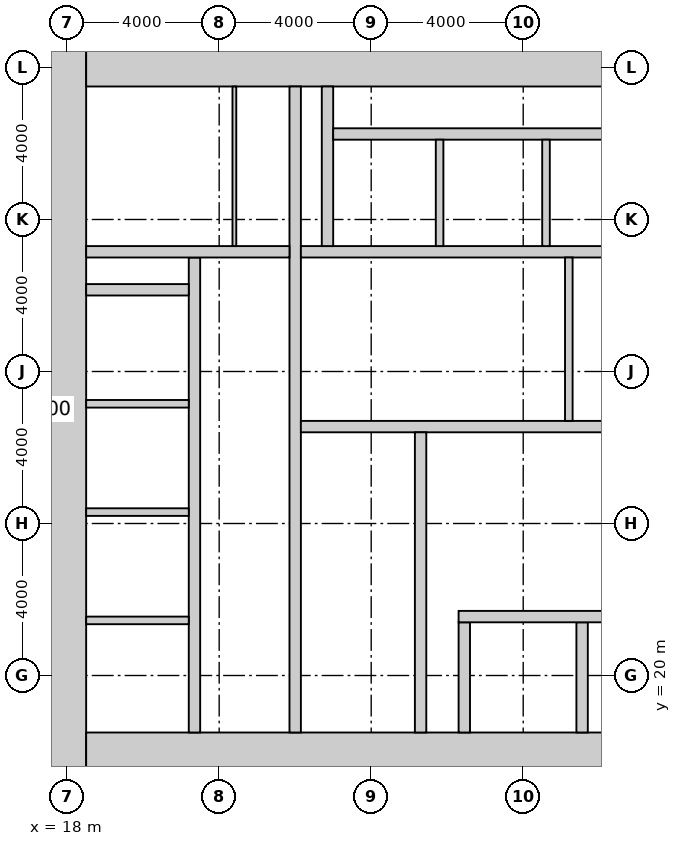
"""IFC4 building model, lengths in metres.
Left out: names, types, materials, properties, quantities, classifications, styles, units other than length and angle.
Written with IfcOpenShell. Run it as: python <this file> out.ifc"""

import sys

from ifc_helpers import new_model, si_unit, direction, frame, frame_2d, origin, place, context, subcontext, project, spatial, rectangle, extrude, element, fill, save


model = new_model("IFC4")
c1 = context("Model", 3, precision=1e-05, world=origin(), true_north=direction((0.0, 1.0)))
c2 = subcontext(c1, "Body", "Model", "MODEL_VIEW")
j1 = project(units=[si_unit("LENGTHUNIT", "METRE"), si_unit("PLANEANGLEUNIT", "RADIAN")], contexts=[c1])
p1 = place(None, origin())
s1 = spatial("IfcSite", under=j1, at=p1, CompositionType="ELEMENT")
p2 = place(p1, origin())
s2 = spatial("IfcBuilding", under=s1, at=p2, CompositionType="ELEMENT")
p3 = place(p2, frame((0.0, 0.0, 121.4)))
s3 = spatial("IfcBuildingStorey", under=s2, at=p3, CompositionType="ELEMENT", Elevation=121.4)
p4 = place(p3, frame((18.0, 17.5, -0.15), z_axis=(0.0, 0.0, 1.0), x_axis=(0.0, 1.0, 0.0)))
e1 = element("IfcWall", 1, at=p4, inside=s3, PredefinedType="SHEAR", context=c2, shape_type="SweptSolid", body=[
    extrude(rectangle(XDim=19.0, YDim=1.0, at=frame_2d((9.5, 0.0))), origin(), (0.0, 0.0, 1.0), 4.0),
])
p5 = place(p3, frame((18.5, 18.0, -0.15), z_axis=(0.0, 0.0, 1.0), x_axis=(1.0, 0.0, 0.0)))
e2 = element("IfcWall", 2, at=p5, inside=s3, PredefinedType="SHEAR", context=c2, shape_type="SweptSolid", body=[
    extrude(rectangle(XDim=17.6, YDim=1.0, at=frame_2d((8.8, 0.0))), origin(), (0.0, 0.0, 1.0), 4.0),
])
p6 = place(p5, frame((3.45, 0.0, 0.15)))
e3 = element("IfcOpeningElement", 3, at=p6, cuts=e2, PredefinedType="OPENING", context=c2, shape_type="SweptSolid", body=[
    extrude(rectangle(XDim=1.5, YDim=2.4, at=frame_2d((0.75, 1.2))), frame((0.0, 0.51, 0.0), z_axis=(0.0, -1.0, 0.0), x_axis=(1.0, 0.0, 0.0)), (0.0, 0.0, 1.0), 1.02),
])
p7 = place(p3, frame((18.5, 36.0, -0.15), z_axis=(0.0, 0.0, 1.0), x_axis=(1.0, 0.0, 0.0)))
e4 = element("IfcWall", 4, at=p7, inside=s3, PredefinedType="SHEAR", context=c2, shape_type="SweptSolid", body=[
    extrude(rectangle(XDim=17.6, YDim=1.0, at=frame_2d((8.8, 0.0))), origin(), (0.0, 0.0, 1.0), 4.0),
])
p8 = place(p3, frame((24.0, 18.5, -0.15), z_axis=(0.0, 0.0, 1.0), x_axis=(0.0, 1.0, 0.0)))
e5 = element("IfcWall", 5, at=p8, inside=s3, PredefinedType="SHEAR", context=c2, shape_type="SweptSolid", body=[
    extrude(rectangle(XDim=17.0, YDim=0.3, at=frame_2d((8.5, 0.0))), origin(), (0.0, 0.0, 1.0), 4.0),
])
p9 = place(p8, frame((9.6, 0.0, 0.15)))
e6 = element("IfcOpeningElement", 6, at=p9, cuts=e5, PredefinedType="OPENING", context=c2, shape_type="SweptSolid", body=[
    extrude(rectangle(XDim=1.5, YDim=2.4, at=frame_2d((0.75, 1.2))), frame((0.0, 0.16, 0.0), z_axis=(0.0, -1.0, 0.0), x_axis=(1.0, 0.0, 0.0)), (0.0, 0.0, 1.0), 0.32),
])
p10 = place(p3, frame((24.15, 26.55, -0.15), z_axis=(0.0, 0.0, 1.0), x_axis=(1.0, 0.0, 0.0)))
e7 = element("IfcWall", 7, at=p10, inside=s3, PredefinedType="SHEAR", context=c2, shape_type="SweptSolid", body=[
    extrude(rectangle(XDim=11.25, YDim=0.3, at=frame_2d((5.625, 0.0))), origin(), (0.0, 0.0, 1.0), 4.0),
])
p11 = place(p10, frame((9.25, 0.0, 0.15)))
e8 = element("IfcOpeningElement", 8, at=p11, cuts=e7, PredefinedType="OPENING", context=c2, shape_type="SweptSolid", body=[
    extrude(rectangle(XDim=1.0, YDim=2.2, at=frame_2d((0.5, 1.1))), frame((0.0, 0.16, 0.0), z_axis=(0.0, -1.0, 0.0), x_axis=(1.0, 0.0, 0.0)), (0.0, 0.0, 1.0), 0.32),
])
p12 = place(p10, frame((4.9, 0.0, 0.15)))
e9 = element("IfcOpeningElement", 9, at=p12, cuts=e7, PredefinedType="OPENING", context=c2, shape_type="SweptSolid", body=[
    extrude(rectangle(XDim=1.5, YDim=2.4, at=frame_2d((0.75, 1.2))), frame((0.0, 0.16, 0.0), z_axis=(0.0, -1.0, 0.0), x_axis=(1.0, 0.0, 0.0)), (0.0, 0.0, 1.0), 0.32),
])
p13 = place(p3, frame((27.3, 18.5, -0.15), z_axis=(0.0, 0.0, 1.0), x_axis=(0.0, 1.0, 0.0)))
e10 = element("IfcWall", 10, at=p13, inside=s3, PredefinedType="SHEAR", context=c2, shape_type="SweptSolid", body=[
    extrude(rectangle(XDim=7.9, YDim=0.3, at=frame_2d((3.95, 0.0))), origin(), (0.0, 0.0, 1.0), 4.0),
])
p14 = place(p13, frame((6.4, 0.0, 0.15)))
e11 = element("IfcOpeningElement", 11, at=p14, cuts=e10, PredefinedType="OPENING", context=c2, shape_type="SweptSolid", body=[
    extrude(rectangle(XDim=1.0, YDim=2.2, at=frame_2d((0.5, 1.1))), frame((0.0, 0.16, 0.0), z_axis=(0.0, -1.0, 0.0), x_axis=(1.0, 0.0, 0.0)), (0.0, 0.0, 1.0), 0.32),
])
for number, where, z_axis, x_axis in (
    (12, (28.45, 18.5, -0.15), (0.0, 0.0, 1.0), (0.0, 1.0, 0.0)),
    (13, (31.55, 18.5, -0.15), (0.0, 0.0, 1.0), (0.0, 1.0, 0.0)),
):
    element("IfcWall", number, at=place(p3, frame(where, z_axis=z_axis, x_axis=x_axis)), inside=s3, PredefinedType="SHEAR", context=c2, shape_type="SweptSolid", body=[
        extrude(rectangle(XDim=2.9, YDim=0.3, at=frame_2d((1.45, 0.0))), origin(), (0.0, 0.0, 1.0), 4.0),
    ])
p15 = place(p3, frame((28.3, 21.55, -0.15), z_axis=(0.0, 0.0, 1.0), x_axis=(1.0, 0.0, 0.0)))
e14 = element("IfcWall", 14, at=p15, inside=s3, PredefinedType="SHEAR", context=c2, shape_type="SweptSolid", body=[
    extrude(rectangle(XDim=3.8, YDim=0.3, at=frame_2d((1.9, 0.0))), origin(), (0.0, 0.0, 1.0), 4.0),
])
p16 = place(p15, frame((1.05, 0.0, 0.15)))
e15 = element("IfcOpeningElement", 15, at=p16, cuts=e14, PredefinedType="OPENING", context=c2, shape_type="SweptSolid", body=[
    extrude(rectangle(XDim=1.3, YDim=2.4, at=frame_2d((0.65, 1.2))), frame((0.0, 0.16, 0.0), z_axis=(0.0, -1.0, 0.0), x_axis=(1.0, 0.0, 0.0)), (0.0, 0.0, 1.0), 0.32),
])
p17 = place(p3, frame((24.15, 31.15, -0.15), z_axis=(0.0, 0.0, 1.0), x_axis=(1.0, 0.0, 0.0)))
e16 = element("IfcWall", 16, at=p17, inside=s3, PredefinedType="SHEAR", context=c2, shape_type="SweptSolid", body=[
    extrude(rectangle(XDim=11.25, YDim=0.3, at=frame_2d((5.625, 0.0))), origin(), (0.0, 0.0, 1.0), 4.0),
])
p18 = place(p17, frame((7.25, 0.0, 0.15)))
e17 = element("IfcOpeningElement", 17, at=p18, cuts=e16, PredefinedType="OPENING", context=c2, shape_type="SweptSolid", body=[
    extrude(rectangle(XDim=1.4, YDim=2.4, at=frame_2d((0.7, 1.2))), frame((0.0, 0.16, 0.0), z_axis=(0.0, -1.0, 0.0), x_axis=(1.0, 0.0, 0.0)), (0.0, 0.0, 1.0), 0.32),
])
p19 = place(p3, frame((21.35, 18.5, -0.15), z_axis=(0.0, 0.0, 1.0), x_axis=(0.0, 1.0, 0.0)))
e18 = element("IfcWall", 18, at=p19, inside=s3, PredefinedType="SHEAR", context=c2, shape_type="SweptSolid", body=[
    extrude(rectangle(XDim=12.5, YDim=0.3, at=frame_2d((6.25, 0.0))), origin(), (0.0, 0.0, 1.0), 4.0),
])
p20 = place(p19, frame((0.875, 0.0, 0.15)))
e19 = element("IfcOpeningElement", 19, at=p20, cuts=e18, PredefinedType="OPENING", context=c2, shape_type="SweptSolid", body=[
    extrude(rectangle(XDim=1.1, YDim=2.2, at=frame_2d((0.55, 1.1))), frame((0.0, 0.16, 0.0), z_axis=(0.0, -1.0, 0.0), x_axis=(1.0, 0.0, 0.0)), (0.0, 0.0, 1.0), 0.32),
])
p21 = place(p19, frame((3.825, 0.0, 0.15)))
e20 = element("IfcOpeningElement", 20, at=p21, cuts=e18, PredefinedType="OPENING", context=c2, shape_type="SweptSolid", body=[
    extrude(rectangle(XDim=1.1, YDim=2.2, at=frame_2d((0.55, 1.1))), frame((0.0, 0.16, 0.0), z_axis=(0.0, -1.0, 0.0), x_axis=(1.0, 0.0, 0.0)), (0.0, 0.0, 1.0), 0.32),
])
p22 = place(p19, frame((6.675, 0.0, 0.15)))
e21 = element("IfcOpeningElement", 21, at=p22, cuts=e18, PredefinedType="OPENING", context=c2, shape_type="SweptSolid", body=[
    extrude(rectangle(XDim=1.1, YDim=2.2, at=frame_2d((0.55, 1.1))), frame((0.0, 0.16, 0.0), z_axis=(0.0, -1.0, 0.0), x_axis=(1.0, 0.0, 0.0)), (0.0, 0.0, 1.0), 0.32),
])
p23 = place(p19, frame((9.575, 0.0, 0.15)))
e22 = element("IfcOpeningElement", 22, at=p23, cuts=e18, PredefinedType="OPENING", context=c2, shape_type="SweptSolid", body=[
    extrude(rectangle(XDim=1.1, YDim=2.2, at=frame_2d((0.55, 1.1))), frame((0.0, 0.16, 0.0), z_axis=(0.0, -1.0, 0.0), x_axis=(1.0, 0.0, 0.0)), (0.0, 0.0, 1.0), 0.32),
])
p24 = place(p3, frame((18.5, 31.15, -0.15), z_axis=(0.0, 0.0, 1.0), x_axis=(1.0, 0.0, 0.0)))
e23 = element("IfcWall", 23, at=p24, inside=s3, PredefinedType="SHEAR", context=c2, shape_type="SweptSolid", body=[
    extrude(rectangle(XDim=5.35, YDim=0.3, at=frame_2d((2.675, 0.0))), origin(), (0.0, 0.0, 1.0), 4.0),
])
p25 = place(p24, frame((4.125, 0.0, 0.15)))
e24 = element("IfcOpeningElement", 24, at=p25, cuts=e23, PredefinedType="OPENING", context=c2, shape_type="SweptSolid", body=[
    extrude(rectangle(XDim=1.0, YDim=2.2, at=frame_2d((0.5, 1.1))), frame((0.0, 0.16, 0.0), z_axis=(0.0, -1.0, 0.0), x_axis=(1.0, 0.0, 0.0)), (0.0, 0.0, 1.0), 0.32),
])
p26 = place(p3, frame((18.5, 30.15, -0.15), z_axis=(0.0, 0.0, 1.0), x_axis=(1.0, 0.0, 0.0)))
e25 = element("IfcWall", 25, at=p26, inside=s3, PredefinedType="SHEAR", context=c2, shape_type="SweptSolid", body=[
    extrude(rectangle(XDim=2.7, YDim=0.3, at=frame_2d((1.35, 0.0))), origin(), (0.0, 0.0, 1.0), 4.0),
])
p27 = place(p3, frame((24.85, 31.3, -0.15), z_axis=(0.0, 0.0, 1.0), x_axis=(0.0, 1.0, 0.0)))
e26 = element("IfcWall", 26, at=p27, inside=s3, PredefinedType="SHEAR", context=c2, shape_type="SweptSolid", body=[
    extrude(rectangle(XDim=4.2, YDim=0.3, at=frame_2d((2.1, 0.0))), origin(), (0.0, 0.0, 1.0), 4.0),
])
p28 = place(p3, frame((25.0, 34.25, -0.15), z_axis=(0.0, 0.0, 1.0), x_axis=(1.0, 0.0, 0.0)))
e27 = element("IfcWall", 27, at=p28, inside=s3, PredefinedType="SHEAR", context=c2, shape_type="SweptSolid", body=[
    extrude(rectangle(XDim=8.6, YDim=0.3, at=frame_2d((4.3, 0.0))), origin(), (0.0, 0.0, 1.0), 4.0),
])
for number, where, z_axis, x_axis in (
    (28, (27.8, 31.3, -0.15), (0.0, 0.0, 1.0), (0.0, 1.0, 0.0)),
    (29, (30.6, 31.3, -0.15), (0.0, 0.0, 1.0), (0.0, 1.0, 0.0)),
):
    element("IfcWall", number, at=place(p3, frame(where, z_axis=z_axis, x_axis=x_axis)), inside=s3, PredefinedType="SOLIDWALL", context=c2, shape_type="SweptSolid", body=[
        extrude(rectangle(XDim=2.8, YDim=0.2, at=frame_2d((1.4, 0.0))), origin(), (0.0, 0.0, 1.0), 4.0),
    ])
for number, where, z_axis, x_axis in (
    (30, (18.5, 21.45, -0.15), (0.0, 0.0, 1.0), (1.0, 0.0, 0.0)),
    (31, (18.5, 24.3, -0.15), (0.0, 0.0, 1.0), (1.0, 0.0, 0.0)),
    (32, (18.5, 27.15, -0.15), (0.0, 0.0, 1.0), (1.0, 0.0, 0.0)),
):
    element("IfcWall", number, at=place(p3, frame(where, z_axis=z_axis, x_axis=x_axis)), inside=s3, PredefinedType="SOLIDWALL", context=c2, shape_type="SweptSolid", body=[
        extrude(rectangle(XDim=2.7, YDim=0.2, at=frame_2d((1.35, 0.0))), origin(), (0.0, 0.0, 1.0), 4.0),
    ])
p29 = place(p3, frame((31.2, 26.7, 0.0), z_axis=(0.0, 0.0, 1.0), x_axis=(0.0, 1.0, 0.0)))
e33 = element("IfcWall", 33, at=p29, inside=s3, PredefinedType="SOLIDWALL", context=c2, shape_type="SweptSolid", body=[
    extrude(rectangle(XDim=4.3, YDim=0.2, at=frame_2d((2.15, 0.0))), origin(), (0.0, 0.0, 1.0), 3.85),
])
p30 = place(p3, frame((22.4, 31.3, 0.0), z_axis=(0.0, 0.0, 1.0), x_axis=(0.0, 1.0, 0.0)))
e34 = element("IfcWall", 34, at=p30, inside=s3, PredefinedType="PARTITIONING", context=c2, shape_type="SweptSolid", body=[
    extrude(rectangle(XDim=4.2, YDim=0.1, at=frame_2d((2.1, 0.0))), origin(), (0.0, 0.0, 1.0), 3.85),
])
p31 = place(p30, frame((1.55, 0.0, 0.0)))
e35 = element("IfcOpeningElement", 35, at=p31, cuts=e34, PredefinedType="OPENING", context=c2, shape_type="SweptSolid", body=[
    extrude(rectangle(XDim=1.0, YDim=2.2, at=frame_2d((0.5, 1.1))), frame((0.0, 0.06, 0.0), z_axis=(0.0, -1.0, 0.0), x_axis=(1.0, 0.0, 0.0)), (0.0, 0.0, 1.0), 0.12),
])
p32 = place(p14, origin())
e36 = element("IfcDoor", 36, at=p32, inside=s3, OperationType="SINGLE_SWING_RIGHT", PredefinedType="DOOR", context=c2, shape_type="SweptSolid", body=[
    extrude(rectangle(XDim=1.0, YDim=2.2, at=frame_2d((0.5, 1.1))), frame((0.0, 0.025, 0.0), z_axis=(0.0, -1.0, 0.0), x_axis=(1.0, 0.0, 0.0)), (0.0, 0.0, 1.0), 0.05),
])
fill(e11, e36)
p33 = place(p12, origin())
e37 = element("IfcDoor", 37, at=p33, inside=s3, OperationType="DOUBLE_DOOR_DOUBLE_SWING", PredefinedType="DOOR", context=c2, shape_type="SweptSolid", body=[
    extrude(rectangle(XDim=1.5, YDim=2.4, at=frame_2d((0.75, 1.2))), frame((0.0, 0.025, 0.0), z_axis=(0.0, -1.0, 0.0), x_axis=(1.0, 0.0, 0.0)), (0.0, 0.0, 1.0), 0.05),
])
fill(e9, e37)
p34 = place(p9, origin())
e38 = element("IfcDoor", 38, at=p34, inside=s3, OperationType="DOUBLE_DOOR_DOUBLE_SWING", PredefinedType="DOOR", context=c2, shape_type="SweptSolid", body=[
    extrude(rectangle(XDim=1.5, YDim=2.4, at=frame_2d((0.75, 1.2))), frame((0.0, 0.025, 0.0), z_axis=(0.0, -1.0, 0.0), x_axis=(1.0, 0.0, 0.0)), (0.0, 0.0, 1.0), 0.05),
])
fill(e6, e38)
p35 = place(p25, origin())
e39 = element("IfcDoor", 39, at=p35, inside=s3, OperationType="SINGLE_SWING_LEFT", PredefinedType="DOOR", context=c2, shape_type="SweptSolid", body=[
    extrude(rectangle(XDim=1.0, YDim=2.2, at=frame_2d((0.5, 1.1))), frame((0.0, 0.025, 0.0), z_axis=(0.0, -1.0, 0.0), x_axis=(1.0, 0.0, 0.0)), (0.0, 0.0, 1.0), 0.05),
])
fill(e24, e39)
p36 = place(p31, origin())
e40 = element("IfcDoor", 40, at=p36, inside=s3, OperationType="SINGLE_SWING_LEFT", PredefinedType="DOOR", context=c2, shape_type="SweptSolid", body=[
    extrude(rectangle(XDim=1.0, YDim=2.2, at=frame_2d((0.5, 1.1))), frame((0.0, 0.025, 0.0), z_axis=(0.0, -1.0, 0.0), x_axis=(1.0, 0.0, 0.0)), (0.0, 0.0, 1.0), 0.05),
])
fill(e35, e40)
p37 = place(p6, origin())
e41 = element("IfcDoor", 41, at=p37, inside=s3, OperationType="DOUBLE_DOOR_DOUBLE_SWING", PredefinedType="DOOR", context=c2, shape_type="SweptSolid", body=[
    extrude(rectangle(XDim=1.5, YDim=2.4, at=frame_2d((0.75, 1.2))), frame((0.0, 0.025, 0.0), z_axis=(0.0, -1.0, 0.0), x_axis=(1.0, 0.0, 0.0)), (0.0, 0.0, 1.0), 0.05),
])
fill(e3, e41)
p38 = place(p16, origin())
e42 = element("IfcDoor", 42, at=p38, inside=s3, OperationType="DOUBLE_DOOR_SLIDING", PredefinedType="DOOR", context=c2, shape_type="SweptSolid", body=[
    extrude(rectangle(XDim=1.3, YDim=2.4, at=frame_2d((0.65, 1.2))), frame((0.0, 0.025, 0.0), z_axis=(0.0, -1.0, 0.0), x_axis=(1.0, 0.0, 0.0)), (0.0, 0.0, 1.0), 0.05),
])
fill(e15, e42)
p39 = place(p18, origin())
e43 = element("IfcDoor", 43, at=p39, inside=s3, OperationType="DOUBLE_DOOR_SLIDING", PredefinedType="DOOR", context=c2, shape_type="SweptSolid", body=[
    extrude(rectangle(XDim=1.4, YDim=2.4, at=frame_2d((0.7, 1.2))), frame((0.0, 0.025, 0.0), z_axis=(0.0, -1.0, 0.0), x_axis=(1.0, 0.0, 0.0)), (0.0, 0.0, 1.0), 0.05),
])
fill(e17, e43)
p40 = place(p20, origin())
e44 = element("IfcDoor", 44, at=p40, inside=s3, OperationType="DOUBLE_DOOR_SLIDING", PredefinedType="DOOR", context=c2, shape_type="SweptSolid", body=[
    extrude(rectangle(XDim=1.1, YDim=2.2, at=frame_2d((0.55, 1.1))), frame((0.0, 0.025, 0.0), z_axis=(0.0, -1.0, 0.0), x_axis=(1.0, 0.0, 0.0)), (0.0, 0.0, 1.0), 0.05),
])
fill(e19, e44)
p41 = place(p21, origin())
e45 = element("IfcDoor", 45, at=p41, inside=s3, OperationType="DOUBLE_DOOR_SLIDING", PredefinedType="DOOR", context=c2, shape_type="SweptSolid", body=[
    extrude(rectangle(XDim=1.1, YDim=2.2, at=frame_2d((0.55, 1.1))), frame((0.0, 0.025, 0.0), z_axis=(0.0, -1.0, 0.0), x_axis=(1.0, 0.0, 0.0)), (0.0, 0.0, 1.0), 0.05),
])
fill(e20, e45)
p42 = place(p22, origin())
e46 = element("IfcDoor", 46, at=p42, inside=s3, OperationType="DOUBLE_DOOR_SLIDING", PredefinedType="DOOR", context=c2, shape_type="SweptSolid", body=[
    extrude(rectangle(XDim=1.1, YDim=2.2, at=frame_2d((0.55, 1.1))), frame((0.0, 0.025, 0.0), z_axis=(0.0, -1.0, 0.0), x_axis=(1.0, 0.0, 0.0)), (0.0, 0.0, 1.0), 0.05),
])
fill(e21, e46)
p43 = place(p23, origin())
e47 = element("IfcDoor", 47, at=p43, inside=s3, OperationType="DOUBLE_DOOR_SLIDING", PredefinedType="DOOR", context=c2, shape_type="SweptSolid", body=[
    extrude(rectangle(XDim=1.1, YDim=2.2, at=frame_2d((0.55, 1.1))), frame((0.0, 0.025, 0.0), z_axis=(0.0, -1.0, 0.0), x_axis=(1.0, 0.0, 0.0)), (0.0, 0.0, 1.0), 0.05),
])
fill(e22, e47)
save(model, sys.argv[1])
